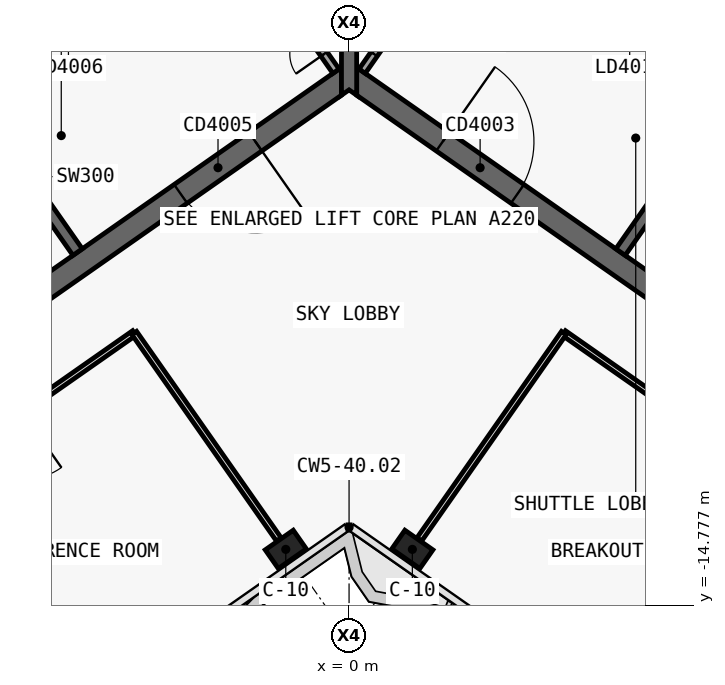
"""IFC4 building model, lengths in metres.
Left out: names, types, materials, properties, quantities, classifications, styles, units other than length and angle.
Written with IfcOpenShell. Run it as: python <this file> out.ifc"""

import sys

from ifc_helpers import new_model, si_unit, direction, frame, frame_2d, origin, origin_2d, place, context, subcontext, project, spatial, polyline, rectangle, outline, extrude, element, fill, save


model = new_model("IFC4")
c1 = context("Model", 3, precision=1e-05, world=origin(), true_north=direction((0.0, 1.0)))
c2 = subcontext(c1, "Body", "Model", "MODEL_VIEW")
j1 = project(units=[si_unit("LENGTHUNIT", "METRE"), si_unit("PLANEANGLEUNIT", "RADIAN")], contexts=[c1])
p1 = place(None, origin())
s1 = spatial("IfcSite", under=j1, at=p1, CompositionType="ELEMENT")
p2 = place(p1, origin())
s2 = spatial("IfcBuilding", under=s1, at=p2, CompositionType="ELEMENT")
p3 = place(p2, frame((0.0, 0.0, 219.4)))
s3 = spatial("IfcBuildingStorey", under=s2, at=p3, CompositionType="ELEMENT", Elevation=219.4)
p4 = place(p3, frame((-0.028, 12.066, 0.0), z_axis=(0.0, 0.0, 1.0), x_axis=(-0.819151382952, -0.573577380837, 0.0)))
e1 = element("IfcWall", 1, at=p4, inside=s3, PredefinedType="SHEAR", context=c2, shape_type="SweptSolid", body=[
    extrude(outline(polyline([(33.898, 0.3), (0.42, 0.3), (0.0, -0.3), (33.898, -0.3), (33.898, 0.3)])), origin(), (0.0, 0.0, 1.0), 6.0),
])
p5 = place(p3, frame((-0.028, -0.874, 0.0), z_axis=(0.0, 0.0, 1.0), x_axis=(-0.819150035022, -0.573579305871, 0.0)))
e2 = element("IfcWall", 2, at=p5, inside=s3, PredefinedType="SHEAR", context=c2, shape_type="SweptSolid", body=[
    extrude(outline(polyline([(26.476, 0.3), (0.42, 0.3), (0.0, -0.3), (26.476, -0.3), (26.476, 0.3)])), origin(), (0.0, 0.0, 1.0), 6.0),
])
p6 = place(p5, frame((2.976, 0.0, 0.0)))
e3 = element("IfcOpeningElement", 3, at=p6, cuts=e2, PredefinedType="OPENING", context=c2, shape_type="SweptSolid", body=[
    extrude(rectangle(XDim=2.4, YDim=2.1, at=frame_2d((1.2, 1.05))), frame((0.0, 0.31, 0.0), z_axis=(0.0, -1.0, 0.0), x_axis=(1.0, 0.0, 0.0)), (0.0, 0.0, 1.0), 0.62),
])
p7 = place(p5, frame((11.776, 0.0, 0.0)))
e4 = element("IfcOpeningElement", 4, at=p7, cuts=e2, PredefinedType="OPENING", context=c2, shape_type="SweptSolid", body=[
    extrude(rectangle(XDim=2.4, YDim=2.1, at=frame_2d((1.2, 1.05))), frame((0.0, 0.31, 0.0), z_axis=(0.0, -1.0, 0.0), x_axis=(1.0, 0.0, 0.0)), (0.0, 0.0, 1.0), 0.62),
])
p8 = place(p3, frame((-7.143, -5.49, 0.0), z_axis=(0.0, 0.0, 1.0), x_axis=(-0.573617744349, 0.819123118565, 0.0)))
e5 = element("IfcWall", 5, at=p8, inside=s3, PredefinedType="SHEAR", context=c2, shape_type="SweptSolid", body=[
    extrude(outline(polyline([(4.85, 0.15), (0.0, 0.15), (0.0, -0.15), (4.85, -0.15), (4.85, 0.15)])), origin(), (0.0, 0.0, 1.0), 6.0),
])
p9 = place(p3, frame((-2.638, 3.768, 0.0), z_axis=(0.0, 0.0, 1.0), x_axis=(-0.819155014212, -0.573572194837, 0.0)))
e6 = element("IfcWall", 6, at=p9, inside=s3, PredefinedType="SHEAR", context=c2, shape_type="SweptSolid", body=[
    extrude(outline(polyline([(26.4, 0.15), (0.0, 0.15), (0.0, -0.15), (26.4, -0.15), (26.4, 0.15)])), origin(), (0.0, 0.0, 1.0), 6.0),
])
p10 = place(p9, frame((1.169, 0.0, 0.0)))
e7 = element("IfcOpeningElement", 7, at=p10, cuts=e6, PredefinedType="OPENING", context=c2, shape_type="SweptSolid", body=[
    extrude(rectangle(XDim=1.1, YDim=2.1, at=frame_2d((0.55, 1.05))), frame((0.0, 0.16, 0.0), z_axis=(0.0, -1.0, 0.0), x_axis=(1.0, 0.0, 0.0)), (0.0, 0.0, 1.0), 0.32),
])
p11 = place(p9, frame((3.206, 0.0, 0.0)))
e8 = element("IfcOpeningElement", 8, at=p11, cuts=e6, PredefinedType="OPENING", context=c2, shape_type="SweptSolid", body=[
    extrude(rectangle(XDim=1.1, YDim=2.1, at=frame_2d((0.55, 1.05))), frame((0.0, 0.16, 0.0), z_axis=(0.0, -1.0, 0.0), x_axis=(1.0, 0.0, 0.0)), (0.0, 0.0, 1.0), 0.32),
])
p12 = place(p9, frame((5.244, 0.0, 0.0)))
e9 = element("IfcOpeningElement", 9, at=p12, cuts=e6, PredefinedType="OPENING", context=c2, shape_type="SweptSolid", body=[
    extrude(rectangle(XDim=1.1, YDim=2.1, at=frame_2d((0.55, 1.05))), frame((0.0, 0.16, 0.0), z_axis=(0.0, -1.0, 0.0), x_axis=(1.0, 0.0, 0.0)), (0.0, 0.0, 1.0), 0.32),
])
p13 = place(p9, frame((7.281, 0.0, 0.0)))
e10 = element("IfcOpeningElement", 10, at=p13, cuts=e6, PredefinedType="OPENING", context=c2, shape_type="SweptSolid", body=[
    extrude(rectangle(XDim=1.1, YDim=2.1, at=frame_2d((0.55, 1.05))), frame((0.0, 0.16, 0.0), z_axis=(0.0, -1.0, 0.0), x_axis=(1.0, 0.0, 0.0)), (0.0, 0.0, 1.0), 0.32),
])
p14 = place(p9, frame((9.688, 0.0, 0.0)))
e11 = element("IfcOpeningElement", 11, at=p14, cuts=e6, PredefinedType="OPENING", context=c2, shape_type="SweptSolid", body=[
    extrude(rectangle(XDim=1.1, YDim=2.1, at=frame_2d((0.55, 1.05))), frame((0.0, 0.16, 0.0), z_axis=(0.0, -1.0, 0.0), x_axis=(1.0, 0.0, 0.0)), (0.0, 0.0, 1.0), 0.32),
])
p15 = place(p9, frame((11.863, 0.0, 0.0)))
e12 = element("IfcOpeningElement", 12, at=p15, cuts=e6, PredefinedType="OPENING", context=c2, shape_type="SweptSolid", body=[
    extrude(rectangle(XDim=1.1, YDim=2.1, at=frame_2d((0.55, 1.05))), frame((0.0, 0.16, 0.0), z_axis=(0.0, -1.0, 0.0), x_axis=(1.0, 0.0, 0.0)), (0.0, 0.0, 1.0), 0.32),
])
p16 = place(p9, frame((15.175, 0.0, 0.0)))
e13 = element("IfcOpeningElement", 13, at=p16, cuts=e6, PredefinedType="OPENING", context=c2, shape_type="SweptSolid", body=[
    extrude(rectangle(XDim=1.0, YDim=2.1, at=frame_2d((0.5, 1.05))), frame((0.0, 0.16, 0.0), z_axis=(0.0, -1.0, 0.0), x_axis=(1.0, 0.0, 0.0)), (0.0, 0.0, 1.0), 0.32),
])
p17 = place(p3, frame((0.028, 12.066, 0.0), z_axis=(0.0, 0.0, 1.0), x_axis=(0.819151382952, -0.573577380837, 0.0)))
e14 = element("IfcWall", 14, at=p17, inside=s3, PredefinedType="SHEAR", context=c2, shape_type="SweptSolid", body=[
    extrude(outline(polyline([(33.898, 0.3), (0.0, 0.3), (0.42, -0.3), (33.898, -0.3), (33.898, 0.3)])), origin(), (0.0, 0.0, 1.0), 6.0),
])
p18 = place(p3, frame((0.028, -0.874, 0.0), z_axis=(0.0, 0.0, 1.0), x_axis=(0.819150035022, -0.573579305871, 0.0)))
e15 = element("IfcWall", 15, at=p18, inside=s3, PredefinedType="SHEAR", context=c2, shape_type="SweptSolid", body=[
    extrude(outline(polyline([(26.476, 0.3), (0.0, 0.3), (0.42, -0.3), (26.476, -0.3), (26.476, 0.3)])), origin(), (0.0, 0.0, 1.0), 6.0),
])
p19 = place(p18, frame((2.976, 0.0, 0.0)))
e16 = element("IfcOpeningElement", 16, at=p19, cuts=e15, PredefinedType="OPENING", context=c2, shape_type="SweptSolid", body=[
    extrude(rectangle(XDim=2.4, YDim=2.1, at=frame_2d((1.2, 1.05))), frame((0.0, 0.31, 0.0), z_axis=(0.0, -1.0, 0.0), x_axis=(1.0, 0.0, 0.0)), (0.0, 0.0, 1.0), 0.62),
])
p20 = place(p18, frame((12.226, 0.0, 0.0)))
e17 = element("IfcOpeningElement", 17, at=p20, cuts=e15, PredefinedType="OPENING", context=c2, shape_type="SweptSolid", body=[
    extrude(rectangle(XDim=1.5, YDim=2.1, at=frame_2d((0.75, 1.05))), frame((0.0, 0.31, 0.0), z_axis=(0.0, -1.0, 0.0), x_axis=(1.0, 0.0, 0.0)), (0.0, 0.0, 1.0), 0.62),
])
p21 = place(p3, frame((7.143, -5.49, 0.0), z_axis=(0.0, 0.0, 1.0), x_axis=(0.573617744349, 0.819123118565, 0.0)))
e18 = element("IfcWall", 18, at=p21, inside=s3, PredefinedType="SHEAR", context=c2, shape_type="SweptSolid", body=[
    extrude(outline(polyline([(0.0, 0.15), (0.0, -0.15), (4.85, -0.15), (4.85, 0.15), (0.0, 0.15)])), origin(), (0.0, 0.0, 1.0), 6.0),
])
p22 = place(p3, frame((2.638, 3.768, 0.0), z_axis=(0.0, 0.0, 1.0), x_axis=(0.819155014212, -0.573572194837, 0.0)))
e19 = element("IfcWall", 19, at=p22, inside=s3, PredefinedType="SHEAR", context=c2, shape_type="SweptSolid", body=[
    extrude(outline(polyline([(0.0, 0.15), (0.0, -0.15), (26.4, -0.15), (26.4, 0.15), (0.0, 0.15)])), origin(), (0.0, 0.0, 1.0), 6.0),
])
p23 = place(p22, frame((1.119, 0.0, 0.0)))
e20 = element("IfcOpeningElement", 20, at=p23, cuts=e19, PredefinedType="OPENING", context=c2, shape_type="SweptSolid", body=[
    extrude(rectangle(XDim=1.2, YDim=2.1, at=frame_2d((0.6, 1.05))), frame((0.0, 0.16, 0.0), z_axis=(0.0, -1.0, 0.0), x_axis=(1.0, 0.0, 0.0)), (0.0, 0.0, 1.0), 0.32),
])
p24 = place(p22, frame((3.156, 0.0, 0.0)))
e21 = element("IfcOpeningElement", 21, at=p24, cuts=e19, PredefinedType="OPENING", context=c2, shape_type="SweptSolid", body=[
    extrude(rectangle(XDim=1.2, YDim=2.1, at=frame_2d((0.6, 1.05))), frame((0.0, 0.16, 0.0), z_axis=(0.0, -1.0, 0.0), x_axis=(1.0, 0.0, 0.0)), (0.0, 0.0, 1.0), 0.32),
])
p25 = place(p22, frame((5.194, 0.0, 0.0)))
e22 = element("IfcOpeningElement", 22, at=p25, cuts=e19, PredefinedType="OPENING", context=c2, shape_type="SweptSolid", body=[
    extrude(rectangle(XDim=1.2, YDim=2.1, at=frame_2d((0.6, 1.05))), frame((0.0, 0.16, 0.0), z_axis=(0.0, -1.0, 0.0), x_axis=(1.0, 0.0, 0.0)), (0.0, 0.0, 1.0), 0.32),
])
p26 = place(p22, frame((7.231, 0.0, 0.0)))
e23 = element("IfcOpeningElement", 23, at=p26, cuts=e19, PredefinedType="OPENING", context=c2, shape_type="SweptSolid", body=[
    extrude(rectangle(XDim=1.2, YDim=2.1, at=frame_2d((0.6, 1.05))), frame((0.0, 0.16, 0.0), z_axis=(0.0, -1.0, 0.0), x_axis=(1.0, 0.0, 0.0)), (0.0, 0.0, 1.0), 0.32),
])
p27 = place(p22, frame((9.637, 0.0, 0.0)))
e24 = element("IfcOpeningElement", 24, at=p27, cuts=e19, PredefinedType="OPENING", context=c2, shape_type="SweptSolid", body=[
    extrude(rectangle(XDim=1.2, YDim=2.1, at=frame_2d((0.6, 1.05))), frame((0.0, 0.16, 0.0), z_axis=(0.0, -1.0, 0.0), x_axis=(1.0, 0.0, 0.0)), (0.0, 0.0, 1.0), 0.32),
])
p28 = place(p22, frame((11.812, 0.0, 0.0)))
e25 = element("IfcOpeningElement", 25, at=p28, cuts=e19, PredefinedType="OPENING", context=c2, shape_type="SweptSolid", body=[
    extrude(rectangle(XDim=1.2, YDim=2.1, at=frame_2d((0.6, 1.05))), frame((0.0, 0.16, 0.0), z_axis=(0.0, -1.0, 0.0), x_axis=(1.0, 0.0, 0.0)), (0.0, 0.0, 1.0), 0.32),
])
p29 = place(p22, frame((13.988, 0.0, 0.0)))
e26 = element("IfcOpeningElement", 26, at=p29, cuts=e19, PredefinedType="OPENING", context=c2, shape_type="SweptSolid", body=[
    extrude(rectangle(XDim=1.2, YDim=2.1, at=frame_2d((0.6, 1.05))), frame((0.0, 0.16, 0.0), z_axis=(0.0, -1.0, 0.0), x_axis=(1.0, 0.0, 0.0)), (0.0, 0.0, 1.0), 0.32),
])
p30 = place(p22, frame((16.262, 0.0, 0.0)))
e27 = element("IfcOpeningElement", 27, at=p30, cuts=e19, PredefinedType="OPENING", context=c2, shape_type="SweptSolid", body=[
    extrude(rectangle(XDim=1.0, YDim=2.1, at=frame_2d((0.5, 1.05))), frame((0.0, 0.16, 0.0), z_axis=(0.0, -1.0, 0.0), x_axis=(1.0, 0.0, 0.0)), (0.0, 0.0, 1.0), 0.32),
])
p31 = place(p3, frame((0.0, -1.361, 0.0), z_axis=(0.0, 0.0, 1.0), x_axis=(0.0, 1.0, 0.0)))
e28 = element("IfcWall", 28, at=p31, inside=s3, PredefinedType="SHEAR", context=c2, shape_type="SweptSolid", body=[
    extrude(outline(polyline([(0.14, 0.2), (0.0, 0.2), (0.14, 0.0), (0.0, -0.2), (0.14, -0.2), (1.012, -0.2), (12.94, -0.2), (13.813, -0.2), (13.893, -0.2), (13.933, -0.172), (13.813, 0.0), (13.933, 0.172), (13.893, 0.2), (13.813, 0.2), (12.94, 0.2), (1.012, 0.2), (0.14, 0.2)])), origin(), (0.0, 0.0, 1.0), 6.0),
])
for number, where, z_axis, x_axis in (
    (29, (-1.665, -13.313, 0.0), (0.0, 0.0, 1.0), (-0.819, -0.574, 0.0)),
    (30, (1.665, -13.313, 0.0), (0.0, 0.0, 1.0), (0.819, -0.574, 0.0)),
):
    element("IfcColumn", number, at=place(p3, frame(where, z_axis=z_axis, x_axis=x_axis)), inside=s3, PredefinedType="COLUMN", context=c2, shape_type="SweptSolid", body=[
        extrude(rectangle(XDim=0.9, YDim=0.6, at=origin_2d()), origin(), (0.0, 0.0, 1.0), 6.0),
    ])
p32 = place(p3, frame((-0.344, -0.729, 0.0), z_axis=(0.0, 0.0, 1.0), x_axis=(-0.573560315113, 0.819163332265, 0.0)))
e31 = element("IfcWall", 31, at=p32, inside=s3, PredefinedType="SOLIDWALL", context=c2, shape_type="SweptSolid", body=[
    extrude(rectangle(XDim=4.85, YDim=0.2, at=frame_2d((2.425, 0.0))), origin(), (0.0, 0.0, 1.0), 5.72),
])
p33 = place(p32, frame((0.55, 0.0, 0.0)))
e32 = element("IfcOpeningElement", 32, at=p33, cuts=e31, PredefinedType="OPENING", context=c2, shape_type="SweptSolid", body=[
    extrude(rectangle(XDim=0.9, YDim=2.1, at=frame_2d((0.45, 1.05))), frame((0.0, 0.11, 0.0), z_axis=(0.0, -1.0, 0.0), x_axis=(1.0, 0.0, 0.0)), (0.0, 0.0, 1.0), 0.22),
])
p34 = place(p3, frame((0.344, -0.729, 0.0), z_axis=(0.0, 0.0, 1.0), x_axis=(0.573560315113, 0.819163332265, 0.0)))
e33 = element("IfcWall", 33, at=p34, inside=s3, PredefinedType="SOLIDWALL", context=c2, shape_type="SweptSolid", body=[
    extrude(rectangle(XDim=4.85, YDim=0.2, at=frame_2d((2.425, 0.0))), origin(), (0.0, 0.0, 1.0), 5.72),
])
p35 = place(p34, frame((0.55, 0.0, 0.0)))
e34 = element("IfcOpeningElement", 34, at=p35, cuts=e33, PredefinedType="OPENING", context=c2, shape_type="SweptSolid", body=[
    extrude(rectangle(XDim=0.9, YDim=2.1, at=frame_2d((0.45, 1.05))), frame((0.0, 0.11, 0.0), z_axis=(0.0, -1.0, 0.0), x_axis=(1.0, 0.0, 0.0)), (0.0, 0.0, 1.0), 0.22),
])
p36 = place(p3, frame((13.026, -12.783, 0.0), z_axis=(0.0, 0.0, 1.0), x_axis=(-0.81915291695, 0.57357519006, 0.0)))
e35 = element("IfcWall", 35, at=p36, inside=s3, PredefinedType="PARTITIONING", context=c2, shape_type="SweptSolid", body=[
    extrude(rectangle(XDim=9.002, YDim=0.15, at=frame_2d((4.501, 0.0))), origin(), (0.0, 0.0, 1.0), 5.15),
])
p37 = place(p36, frame((4.051, 0.0, 0.0)))
e36 = element("IfcOpeningElement", 36, at=p37, cuts=e35, PredefinedType="OPENING", context=c2, shape_type="SweptSolid", body=[
    extrude(rectangle(XDim=0.9, YDim=2.1, at=frame_2d((0.45, 1.05))), frame((0.0, 0.085, 0.0), z_axis=(0.0, -1.0, 0.0), x_axis=(1.0, 0.0, 0.0)), (0.0, 0.0, 1.0), 0.17),
])
p38 = place(p3, frame((-5.652, -7.62, 0.0), z_axis=(0.0, 0.0, 1.0), x_axis=(-0.81915291695, -0.57357519006, 0.0)))
e37 = element("IfcWall", 37, at=p38, inside=s3, PredefinedType="PARTITIONING", context=c2, shape_type="SweptSolid", body=[
    extrude(rectangle(XDim=9.002, YDim=0.15, at=frame_2d((4.501, 0.0))), origin(), (0.0, 0.0, 1.0), 5.15),
])
p39 = place(p38, frame((3.601, 0.0, 0.0)))
e38 = element("IfcOpeningElement", 38, at=p39, cuts=e37, PredefinedType="OPENING", context=c2, shape_type="SweptSolid", body=[
    extrude(rectangle(XDim=1.8, YDim=2.4, at=frame_2d((0.9, 1.2))), frame((0.0, 0.085, 0.0), z_axis=(0.0, -1.0, 0.0), x_axis=(1.0, 0.0, 0.0)), (0.0, 0.0, 1.0), 0.17),
])
p40 = place(p3, frame((1.849, -13.051, 0.0), z_axis=(0.0, 0.0, 1.0), x_axis=(0.57357355307, 0.819154063177, 0.0)))
e39 = element("IfcWall", 39, at=p40, inside=s3, PredefinedType="PARTITIONING", context=c2, shape_type="SweptSolid", body=[
    extrude(rectangle(XDim=6.63, YDim=0.15, at=frame_2d((3.315, 0.0))), origin(), (0.0, 0.0, 1.0), 5.15),
])
p41 = place(p3, frame((-1.849, -13.051, 0.0), z_axis=(0.0, 0.0, 1.0), x_axis=(-0.573575988258, 0.819152358047, 0.0)))
e40 = element("IfcWall", 40, at=p41, inside=s3, PredefinedType="PARTITIONING", context=c2, shape_type="SweptSolid", body=[
    extrude(rectangle(XDim=6.632, YDim=0.15, at=frame_2d((3.316, 0.0))), origin(), (0.0, 0.0, 1.0), 5.15),
])
p42 = place(p6, origin())
e41 = element("IfcDoor", 41, at=p42, inside=s3, OperationType="DOUBLE_DOOR_SINGLE_SWING", PredefinedType="DOOR", context=c2, shape_type="SweptSolid", body=[
    extrude(rectangle(XDim=2.4, YDim=2.1, at=frame_2d((1.2, 1.05))), frame((0.0, 0.025, 0.0), z_axis=(0.0, -1.0, 0.0), x_axis=(1.0, 0.0, 0.0)), (0.0, 0.0, 1.0), 0.05),
])
fill(e3, e41)
p43 = place(p19, origin())
e42 = element("IfcDoor", 42, at=p43, inside=s3, OperationType="DOUBLE_DOOR_SINGLE_SWING", PredefinedType="DOOR", context=c2, shape_type="SweptSolid", body=[
    extrude(rectangle(XDim=2.4, YDim=2.1, at=frame_2d((1.2, 1.05))), frame((0.0, 0.025, 0.0), z_axis=(0.0, -1.0, 0.0), x_axis=(1.0, 0.0, 0.0)), (0.0, 0.0, 1.0), 0.05),
])
fill(e16, e42)
p44 = place(p33, origin())
e43 = element("IfcDoor", 43, at=p44, inside=s3, OperationType="SINGLE_SWING_RIGHT", PredefinedType="DOOR", context=c2, shape_type="SweptSolid", body=[
    extrude(rectangle(XDim=0.9, YDim=2.1, at=frame_2d((0.45, 1.05))), frame((0.0, 0.025, 0.0), z_axis=(0.0, -1.0, 0.0), x_axis=(1.0, 0.0, 0.0)), (0.0, 0.0, 1.0), 0.05),
])
fill(e32, e43)
p45 = place(p35, origin())
e44 = element("IfcDoor", 44, at=p45, inside=s3, OperationType="SINGLE_SWING_RIGHT", PredefinedType="DOOR", context=c2, shape_type="SweptSolid", body=[
    extrude(rectangle(XDim=0.9, YDim=2.1, at=frame_2d((0.45, 1.05))), frame((0.0, 0.025, 0.0), z_axis=(0.0, -1.0, 0.0), x_axis=(1.0, 0.0, 0.0)), (0.0, 0.0, 1.0), 0.05),
])
fill(e34, e44)
save(model, sys.argv[1])
